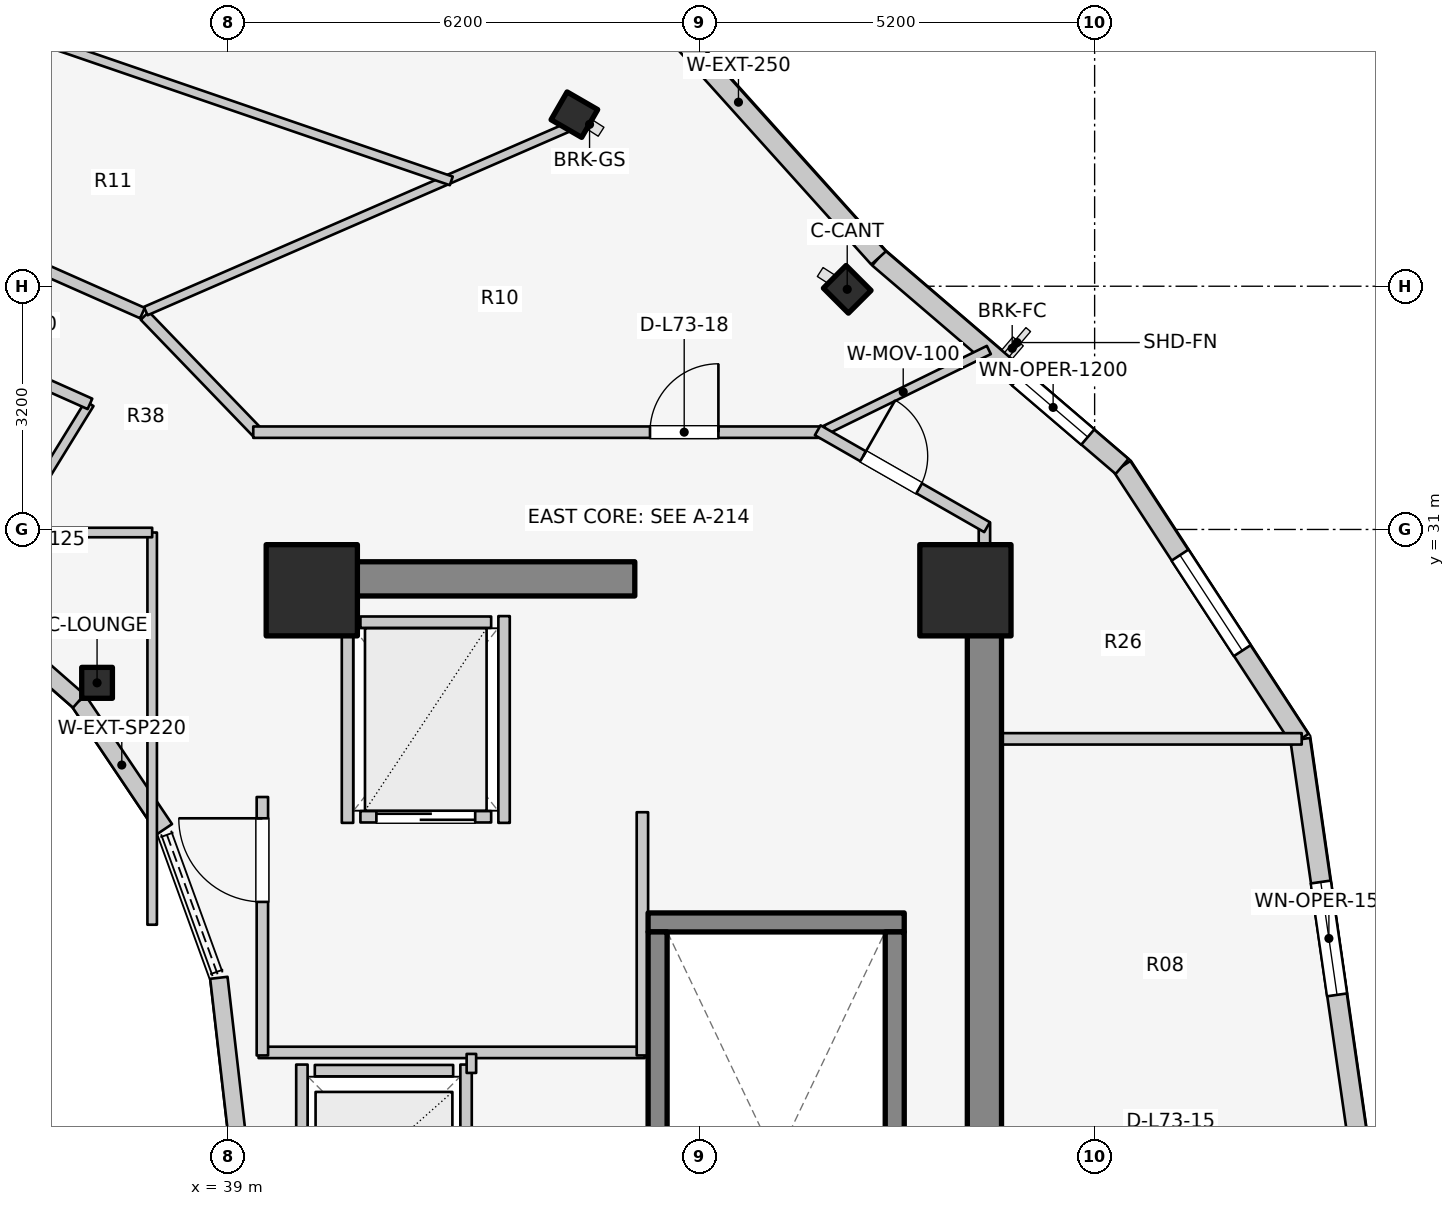
"""IFC4 building model, lengths in metres.
Left out: names, types, materials, properties, quantities, classifications, styles, units other than length and angle.
Written with IfcOpenShell. Run it as: python <this file> out.ifc"""

import sys

from ifc_helpers import new_model, si_unit, direction, frame, frame_2d, origin, origin_2d, place, context, subcontext, project, spatial, rectangle, i_section, extrude, element, fill, save


model = new_model("IFC4")
c1 = context("Model", 3, precision=1e-05, world=origin(), true_north=direction((0.0, 1.0)))
c2 = subcontext(c1, "Body", "Model", "MODEL_VIEW")
j1 = project(units=[si_unit("LENGTHUNIT", "METRE"), si_unit("PLANEANGLEUNIT", "RADIAN")], contexts=[c1])
p1 = place(None, origin())
s1 = spatial("IfcSite", under=j1, at=p1, CompositionType="ELEMENT")
p2 = place(p1, origin())
s2 = spatial("IfcBuilding", under=s1, at=p2, CompositionType="ELEMENT")
p3 = place(p2, frame((0.0, 0.0, 238.8)))
s3 = spatial("IfcBuildingStorey", under=s2, at=p3, CompositionType="ELEMENT", Elevation=238.8)
p4 = place(p3, frame((48.95, 17.05, 0.0), z_axis=(0.0, 0.0, 1.0), x_axis=(0.0, 1.0, 0.0)))
e1 = element("IfcWall", 1, at=p4, inside=s3, PredefinedType="SHEAR", context=c2, shape_type="SweptSolid", body=[
    extrude(rectangle(XDim=12.8, YDim=0.45, at=frame_2d((6.4, 0.0))), origin(), (0.0, 0.0, 1.0), 3.6),
])
p5 = place(p3, frame((39.85, 30.35, 0.0), z_axis=(0.0, 0.0, 1.0), x_axis=(1.0, 0.0, 0.0)))
e2 = element("IfcWall", 2, at=p5, inside=s3, PredefinedType="SHEAR", context=c2, shape_type="SweptSolid", body=[
    extrude(rectangle(XDim=4.5, YDim=0.45, at=frame_2d((2.25, 0.0))), origin(), (0.0, 0.0, 1.0), 3.6),
])
p6 = place(p3, frame((44.525, 25.83, 0.0), z_axis=(0.0, 0.0, 1.0), x_axis=(1.0, 0.0, 0.0)))
e3 = element("IfcWall", 3, at=p6, inside=s3, PredefinedType="SOLIDWALL", context=c2, shape_type="SweptSolid", body=[
    extrude(rectangle(XDim=3.37, YDim=0.25, at=frame_2d((1.685, 0.0))), origin(), (0.0, 0.0, 1.0), 3.6),
])
for number, where, z_axis, x_axis in (
    (4, (44.65, 17.895, 0.0), (0.0, 0.0, 1.0), (0.0, 1.0, 0.0)),
    (5, (47.77, 17.895, 0.0), (0.0, 0.0, 1.0), (0.0, 1.0, 0.0)),
):
    element("IfcWall", number, at=place(p3, frame(where, z_axis=z_axis, x_axis=x_axis)), inside=s3, PredefinedType="SOLIDWALL", context=c2, shape_type="SweptSolid", body=[
        extrude(rectangle(XDim=7.81, YDim=0.25, at=frame_2d((3.905, 0.0))), origin(), (0.0, 0.0, 1.0), 3.6),
    ])
for number, where, z_axis, x_axis in (
    (6, (48.7, 30.2, 0.0), (0.0, 0.0, 1.0), (1.0, 0.0, 0.0)),
    (7, (40.1, 30.2, 0.0), (0.0, 0.0, 1.0), (1.0, 0.0, 0.0)),
):
    element("IfcColumn", number, at=place(p3, frame(where, z_axis=z_axis, x_axis=x_axis)), inside=s3, PredefinedType="COLUMN", context=c2, shape_type="SweptSolid", body=[
        extrude(rectangle(XDim=1.2, YDim=1.2, at=origin_2d()), origin(), (0.0, 0.0, 1.0), 3.6),
    ])
p7 = place(p3, frame((37.275, 28.982, 0.0), z_axis=(0.0, 0.0, 1.0), x_axis=(1.0, 0.0, 0.0)))
e8 = element("IfcColumn", 8, at=p7, inside=s3, PredefinedType="COLUMN", context=c2, shape_type="SweptSolid", body=[
    extrude(i_section(OverallWidth=0.404, OverallDepth=0.407, WebThickness=0.027, FlangeThickness=0.044, FilletRadius=0.025, at=origin_2d()), origin(), (0.0, 0.0, 1.0), 3.6),
])
for number, where, z_axis, x_axis in (
    (9, (47.145, 34.159, 0.0), (0.0, 0.0, 1.0), (0.707, 0.707, 0.0)),
    (10, (43.555, 36.457, 0.0), (0.0, 0.0, 1.0), (0.5, 0.866, 0.0)),
):
    element("IfcColumn", number, at=place(p3, frame(where, z_axis=z_axis, x_axis=x_axis)), inside=s3, PredefinedType="COLUMN", context=c2, shape_type="SweptSolid", body=[
        extrude(i_section(OverallWidth=0.422, OverallDepth=0.465, WebThickness=0.045, FlangeThickness=0.073, FilletRadius=0.025, at=origin_2d()), origin(), (0.0, 0.0, 1.0), 3.6),
    ])
p8 = place(p3, frame((39.12, 23.0, 0.0), z_axis=(0.0, 0.0, 1.0), x_axis=(-0.114711713601, 0.993398823617, 0.0)))
e11 = element("IfcWall", 11, at=p8, inside=s3, PredefinedType="STANDARD", context=c2, shape_type="SweptSolid", body=[
    extrude(rectangle(XDim=2.115, YDim=0.23, at=frame_2d((1.058, 0.0))), origin(), (0.0, 0.0, 1.0), 3.28),
])
p9 = place(p3, frame((38.166, 27.06, 0.0), z_axis=(0.0, 0.0, 1.0), x_axis=(-0.558197800898, 0.829707909492, 0.0)))
e12 = element("IfcWall", 12, at=p9, inside=s3, PredefinedType="STANDARD", context=c2, shape_type="SweptSolid", body=[
    extrude(rectangle(XDim=2.027, YDim=0.23, at=frame_2d((1.013, 0.0))), origin(), (0.0, 0.0, 1.0), 2.6),
])
p10 = place(p3, frame((37.035, 28.742, 0.0), z_axis=(0.0, 0.0, 1.0), x_axis=(-0.752576694707, 0.658504607869, 0.0)))
e13 = element("IfcWall", 13, at=p10, inside=s3, PredefinedType="STANDARD", context=c2, shape_type="SweptSolid", body=[
    extrude(rectangle(XDim=1.959, YDim=0.23, at=frame_2d((0.98, 0.0))), origin(), (0.0, 0.0, 1.0), 2.6),
])
p11 = place(p3, frame((53.86, 23.0, 0.0), z_axis=(0.0, 0.0, 1.0), x_axis=(-0.142712754019, 0.989764148593, 0.0)))
e14 = element("IfcWall", 14, at=p11, inside=s3, PredefinedType="STANDARD", context=c2, shape_type="SweptSolid", body=[
    extrude(rectangle(XDim=5.293, YDim=0.26, at=frame_2d((2.646, 0.0))), origin(), (0.0, 0.0, 1.0), 3.29),
])
p12 = place(p11, frame((1.896, 0.0, 0.75)))
e15 = element("IfcOpeningElement", 15, at=p12, cuts=e14, PredefinedType="OPENING", context=c2, shape_type="SweptSolid", body=[
    extrude(rectangle(XDim=1.5, YDim=1.6, at=frame_2d((0.75, 0.8))), frame((0.0, 0.14, 0.0), z_axis=(0.0, -1.0, 0.0), x_axis=(1.0, 0.0, 0.0)), (0.0, 0.0, 1.0), 0.28),
])
p13 = place(p3, frame((53.105, 28.239, 0.0), z_axis=(0.0, 0.0, 1.0), x_axis=(-0.546606419826, 0.837389647539, 0.0)))
e16 = element("IfcWall", 16, at=p13, inside=s3, PredefinedType="STANDARD", context=c2, shape_type="SweptSolid", body=[
    extrude(rectangle(XDim=4.288, YDim=0.26, at=frame_2d((2.144, 0.0))), origin(), (0.0, 0.0, 1.0), 3.29),
])
p14 = place(p13, frame((1.394, 0.0, 0.75)))
e17 = element("IfcOpeningElement", 17, at=p14, cuts=e16, PredefinedType="OPENING", context=c2, shape_type="SweptSolid", body=[
    extrude(rectangle(XDim=1.5, YDim=1.6, at=frame_2d((0.75, 0.8))), frame((0.0, 0.14, 0.0), z_axis=(0.0, -1.0, 0.0), x_axis=(1.0, 0.0, 0.0)), (0.0, 0.0, 1.0), 0.28),
])
p15 = place(p3, frame((50.761, 31.829, 0.0), z_axis=(0.0, 0.0, 1.0), x_axis=(-0.759587504333, 0.650405122413, 0.0)))
e18 = element("IfcWall", 18, at=p15, inside=s3, PredefinedType="STANDARD", context=c2, shape_type="SweptSolid", body=[
    extrude(rectangle(XDim=4.217, YDim=0.26, at=frame_2d((2.109, 0.0))), origin(), (0.0, 0.0, 1.0), 3.29),
])
p16 = place(p15, frame((0.594, 0.0, 0.75)))
e19 = element("IfcOpeningElement", 19, at=p16, cuts=e18, PredefinedType="OPENING", context=c2, shape_type="SweptSolid", body=[
    extrude(rectangle(XDim=1.2, YDim=1.5, at=frame_2d((0.6, 0.75))), frame((0.0, 0.14, 0.0), z_axis=(0.0, -1.0, 0.0), x_axis=(1.0, 0.0, 0.0)), (0.0, 0.0, 1.0), 0.28),
])
p17 = place(p3, frame((47.558, 34.572, 0.0), z_axis=(0.0, 0.0, 1.0), x_axis=(-0.668903560134, 0.743349196031, 0.0)))
e20 = element("IfcWall", 20, at=p17, inside=s3, PredefinedType="STANDARD", context=c2, shape_type="SweptSolid", body=[
    extrude(rectangle(XDim=5.513, YDim=0.26, at=frame_2d((2.756, 0.0))), origin(), (0.0, 0.0, 1.0), 3.29),
])
p18 = place(p3, frame((40.14, 23.88, 0.0), z_axis=(0.0, 0.0, 1.0), x_axis=(1.0, 0.0, 0.0)))
e21 = element("IfcWall", 21, at=p18, inside=s3, PredefinedType="SOLIDWALL", context=c2, shape_type="SweptSolid", body=[
    extrude(rectangle(XDim=1.82, YDim=0.15, at=frame_2d((0.91, 0.0))), origin(), (0.0, 0.0, 1.0), 2.62),
])
p19 = place(p3, frame((39.97, 21.64, 0.0), z_axis=(0.0, 0.0, 1.0), x_axis=(0.0, 1.0, 0.0)))
e22 = element("IfcWall", 22, at=p19, inside=s3, PredefinedType="SOLIDWALL", context=c2, shape_type="SweptSolid", body=[
    extrude(rectangle(XDim=2.32, YDim=0.15, at=frame_2d((1.16, 0.0))), origin(), (0.0, 0.0, 1.0), 2.62),
])
p20 = place(p3, frame((42.13, 21.64, 0.0), z_axis=(0.0, 0.0, 1.0), x_axis=(0.0, 1.0, 0.0)))
e23 = element("IfcWall", 23, at=p20, inside=s3, PredefinedType="SOLIDWALL", context=c2, shape_type="SweptSolid", body=[
    extrude(rectangle(XDim=2.32, YDim=0.15, at=frame_2d((1.16, 0.0))), origin(), (0.0, 0.0, 1.0), 3.295),
])
p21 = place(p3, frame((40.74, 27.22, 0.0), z_axis=(0.0, 0.0, 1.0), x_axis=(1.0, 0.0, 0.0)))
e24 = element("IfcWall", 24, at=p21, inside=s3, PredefinedType="SOLIDWALL", context=c2, shape_type="SweptSolid", body=[
    extrude(rectangle(XDim=1.72, YDim=0.15, at=frame_2d((0.86, 0.0))), origin(), (0.0, 0.0, 1.0), 3.295),
])
p22 = place(p21, frame((0.21, 0.0, 0.0)))
e25 = element("IfcOpeningElement", 25, at=p22, cuts=e24, PredefinedType="OPENING", context=c2, shape_type="SweptSolid", body=[
    extrude(rectangle(XDim=1.3, YDim=2.1, at=frame_2d((0.65, 1.05))), frame((0.0, 0.085, 0.0), z_axis=(0.0, -1.0, 0.0), x_axis=(1.0, 0.0, 0.0)), (0.0, 0.0, 1.0), 0.17),
])
p23 = place(p3, frame((40.74, 29.78, 0.0), z_axis=(0.0, 0.0, 1.0), x_axis=(1.0, 0.0, 0.0)))
e26 = element("IfcWall", 26, at=p23, inside=s3, PredefinedType="SOLIDWALL", context=c2, shape_type="SweptSolid", body=[
    extrude(rectangle(XDim=1.72, YDim=0.15, at=frame_2d((0.86, 0.0))), origin(), (0.0, 0.0, 1.0), 3.295),
])
for number, where, z_axis, x_axis in (
    (27, (40.57, 27.14, 0.0), (0.0, 0.0, 1.0), (0.0, 1.0, 0.0)),
    (28, (42.63, 27.14, 0.0), (0.0, 0.0, 1.0), (0.0, 1.0, 0.0)),
):
    element("IfcWall", number, at=place(p3, frame(where, z_axis=z_axis, x_axis=x_axis)), inside=s3, PredefinedType="SOLIDWALL", context=c2, shape_type="SweptSolid", body=[
        extrude(rectangle(XDim=2.72, YDim=0.15, at=frame_2d((1.36, 0.0))), origin(), (0.0, 0.0, 1.0), 3.295),
    ])
p24 = place(p3, frame((39.4, 24.12, 0.0), z_axis=(0.0, 0.0, 1.0), x_axis=(1.0, 0.0, 0.0)))
e29 = element("IfcWall", 29, at=p24, inside=s3, PredefinedType="PARTITIONING", context=c2, shape_type="SweptSolid", body=[
    extrude(rectangle(XDim=5.08, YDim=0.15, at=frame_2d((2.54, 0.0))), origin(), (0.0, 0.0, 1.0), 2.62),
])
p25 = place(p3, frame((44.45, 24.08, 0.0), z_axis=(0.0, 0.0, 1.0), x_axis=(0.0, 1.0, 0.0)))
e30 = element("IfcWall", 30, at=p25, inside=s3, PredefinedType="PARTITIONING", context=c2, shape_type="SweptSolid", body=[
    extrude(rectangle(XDim=3.2, YDim=0.15, at=frame_2d((1.6, 0.0))), origin(), (0.0, 0.0, 1.0), 3.295),
])
p26 = place(p3, frame((39.45, 24.08, 0.0), z_axis=(0.0, 0.0, 1.0), x_axis=(0.0, 1.0, 0.0)))
e31 = element("IfcWall", 31, at=p26, inside=s3, PredefinedType="PARTITIONING", context=c2, shape_type="SweptSolid", body=[
    extrude(rectangle(XDim=3.4, YDim=0.15, at=frame_2d((1.7, 0.0))), origin(), (0.0, 0.0, 1.0), 3.295),
])
p27 = place(p26, frame((2.02, 0.0, 0.0)))
e32 = element("IfcOpeningElement", 32, at=p27, cuts=e31, PredefinedType="OPENING", context=c2, shape_type="SweptSolid", body=[
    extrude(rectangle(XDim=1.1, YDim=2.1, at=frame_2d((0.55, 1.05))), frame((0.0, 0.085, 0.0), z_axis=(0.0, -1.0, 0.0), x_axis=(1.0, 0.0, 0.0)), (0.0, 0.0, 1.0), 0.17),
])
p28 = place(p3, frame((42.2, 23.85, 0.0), z_axis=(0.0, 0.0, 1.0), x_axis=(0.0, 1.0, 0.0)))
e33 = element("IfcWall", 33, at=p28, inside=s3, PredefinedType="PARTITIONING", context=c2, shape_type="SweptSolid", body=[
    extrude(rectangle(XDim=0.25, YDim=0.125, at=frame_2d((0.125, 0.0))), origin(), (0.0, 0.0, 1.0), 3.295),
])
p29 = place(p3, frame((35.55, 30.015, 0.0), z_axis=(0.0, 0.0, 1.0), x_axis=(0.523992004803, 0.851723182086, 0.0)))
e34 = element("IfcWall", 34, at=p29, inside=s3, PredefinedType="PARTITIONING", context=c2, shape_type="SweptSolid", body=[
    extrude(rectangle(XDim=3.101, YDim=0.125, at=frame_2d((1.551, 0.0))), origin(), (0.0, 0.0, 1.0), 2.672),
])
p30 = place(p3, frame((37.181, 32.652, 0.0), z_axis=(0.0, 0.0, 1.0), x_axis=(-0.913120130558, 0.407690602257, 0.0)))
e35 = element("IfcWall", 35, at=p30, inside=s3, PredefinedType="PARTITIONING", context=c2, shape_type="SweptSolid", body=[
    extrude(rectangle(XDim=2.743, YDim=0.15, at=frame_2d((1.371, 0.0))), origin(), (0.0, 0.0, 1.0), 2.823),
])
p31 = place(p3, frame((38.0, 25.8, 0.0), z_axis=(0.0, 0.0, 1.0), x_axis=(0.0, 1.0, 0.0)))
e36 = element("IfcWall", 36, at=p31, inside=s3, PredefinedType="PARTITIONING", context=c2, shape_type="SweptSolid", body=[
    extrude(rectangle(XDim=5.16, YDim=0.125, at=frame_2d((2.58, 0.0))), origin(), (0.0, 0.0, 1.0), 2.672),
])
p32 = place(p3, frame((35.4, 30.96, 0.0), z_axis=(0.0, 0.0, 1.0), x_axis=(1.0, 0.0, 0.0)))
e37 = element("IfcWall", 37, at=p32, inside=s3, PredefinedType="PARTITIONING", context=c2, shape_type="SweptSolid", body=[
    extrude(rectangle(XDim=2.6, YDim=0.125, at=frame_2d((1.3, 0.0))), origin(), (0.0, 0.0, 1.0), 2.816),
])
p33 = place(p3, frame((48.95, 28.245, 0.0), z_axis=(0.0, 0.0, 1.0), x_axis=(1.0, 0.0, 0.0)))
e38 = element("IfcWall", 38, at=p33, inside=s3, PredefinedType="PARTITIONING", context=c2, shape_type="SweptSolid", body=[
    extrude(rectangle(XDim=4.175, YDim=0.15, at=frame_2d((2.087, 0.0))), origin(), (0.0, 0.0, 1.0), 3.295),
])
p34 = place(p3, frame((48.95, 29.8, 0.0), z_axis=(0.0, 0.0, 1.0), x_axis=(0.0, 1.0, 0.0)))
e39 = element("IfcWall", 39, at=p34, inside=s3, PredefinedType="PARTITIONING", context=c2, shape_type="SweptSolid", body=[
    extrude(rectangle(XDim=1.29, YDim=0.15, at=frame_2d((0.645, 0.0))), origin(), (0.0, 0.0, 1.0), 3.295),
])
p35 = place(p3, frame((46.755, 32.258, 0.0), z_axis=(0.0, 0.0, 1.0), x_axis=(0.898152129572, 0.439684832745, 0.0)))
e40 = element("IfcWall", 40, at=p35, inside=s3, PredefinedType="MOVABLE", context=c2, shape_type="SweptSolid", body=[
    extrude(rectangle(XDim=2.509, YDim=0.12, at=frame_2d((1.254, 0.0))), origin(), (0.0, 0.0, 1.0), 2.66),
])
p36 = place(p3, frame((37.903, 33.812, 0.0), z_axis=(0.0, 0.0, 1.0), x_axis=(0.694032962553, -0.719943224768, 0.0)))
e41 = element("IfcWall", 41, at=p36, inside=s3, PredefinedType="PARTITIONING", context=c2, shape_type="SweptSolid", body=[
    extrude(rectangle(XDim=2.158, YDim=0.15, at=frame_2d((1.079, 0.0))), origin(), (0.0, 0.0, 1.0), 2.816),
])
p37 = place(p3, frame((39.33, 32.28, 0.0), z_axis=(0.0, 0.0, 1.0), x_axis=(1.0, 0.0, 0.0)))
e42 = element("IfcWall", 42, at=p37, inside=s3, PredefinedType="PARTITIONING", context=c2, shape_type="SweptSolid", body=[
    extrude(rectangle(XDim=7.52, YDim=0.15, at=frame_2d((3.76, 0.0))), origin(), (0.0, 0.0, 1.0), 2.816),
])
p38 = place(p37, frame((5.22, 0.0, 0.0)))
e43 = element("IfcOpeningElement", 43, at=p38, cuts=e42, PredefinedType="OPENING", context=c2, shape_type="SweptSolid", body=[
    extrude(rectangle(XDim=0.9, YDim=2.1, at=frame_2d((0.45, 1.05))), frame((0.0, 0.085, 0.0), z_axis=(0.0, -1.0, 0.0), x_axis=(1.0, 0.0, 0.0)), (0.0, 0.0, 1.0), 0.17),
])
p39 = place(p3, frame((46.757, 32.305, 0.0), z_axis=(0.0, 0.0, 1.0), x_axis=(0.867991349648, -0.496579315857, 0.0)))
e44 = element("IfcWall", 44, at=p39, inside=s3, PredefinedType="PARTITIONING", context=c2, shape_type="SweptSolid", body=[
    extrude(rectangle(XDim=2.567, YDim=0.15, at=frame_2d((1.283, 0.0))), origin(), (0.0, 0.0, 1.0), 2.66),
])
p40 = place(p39, frame((0.688, 0.0, 0.0)))
e45 = element("IfcOpeningElement", 45, at=p40, cuts=e44, PredefinedType="OPENING", context=c2, shape_type="SweptSolid", body=[
    extrude(rectangle(XDim=0.85, YDim=2.05, at=frame_2d((0.425, 1.025))), frame((0.0, 0.085, 0.0), z_axis=(0.0, -1.0, 0.0), x_axis=(1.0, 0.0, 0.0)), (0.0, 0.0, 1.0), 0.17),
])
p41 = place(p3, frame((37.915, 33.873, 0.0), z_axis=(0.0, 0.0, 1.0), x_axis=(0.916946661839, 0.399009798554, 0.0)))
e46 = element("IfcWall", 46, at=p41, inside=s3, PredefinedType="MOVABLE", context=c2, shape_type="SweptSolid", body=[
    extrude(rectangle(XDim=6.042, YDim=0.12, at=frame_2d((3.021, 0.0))), origin(), (0.0, 0.0, 1.0), 2.66),
])
p42 = place(p3, frame((37.872, 33.847, 0.0), z_axis=(0.0, 0.0, 1.0), x_axis=(-0.914384748819, 0.404846305563, 0.0)))
e47 = element("IfcWall", 47, at=p42, inside=s3, PredefinedType="PARTITIONING", context=c2, shape_type="SweptSolid", body=[
    extrude(rectangle(XDim=3.104, YDim=0.15, at=frame_2d((1.552, 0.0))), origin(), (0.0, 0.0, 1.0), 2.823),
])
p43 = place(p3, frame((41.935, 35.586, 0.0), z_axis=(0.0, 0.0, 1.0), x_axis=(-0.945789589552, 0.324780005995, 0.0)))
e48 = element("IfcWall", 48, at=p43, inside=s3, PredefinedType="MOVABLE", context=c2, shape_type="SweptSolid", body=[
    extrude(rectangle(XDim=6.465, YDim=0.12, at=frame_2d((3.232, 0.0))), origin(), (0.0, 0.0, 1.0), 2.823),
])
p44 = place(p12, origin())
e49 = element("IfcWindow", 49, at=p44, inside=s3, PartitioningType="SINGLE_PANEL", PredefinedType="WINDOW", context=c2, shape_type="SweptSolid", body=[
    extrude(rectangle(XDim=1.5, YDim=1.6, at=frame_2d((0.75, 0.8))), frame((0.0, 0.03, 0.0), z_axis=(0.0, -1.0, 0.0), x_axis=(1.0, 0.0, 0.0)), (0.0, 0.0, 1.0), 0.06),
])
fill(e15, e49)
p45 = place(p14, origin())
e50 = element("IfcWindow", 50, at=p45, inside=s3, PartitioningType="SINGLE_PANEL", PredefinedType="WINDOW", context=c2, shape_type="SweptSolid", body=[
    extrude(rectangle(XDim=1.5, YDim=1.6, at=frame_2d((0.75, 0.8))), frame((0.0, 0.03, 0.0), z_axis=(0.0, -1.0, 0.0), x_axis=(1.0, 0.0, 0.0)), (0.0, 0.0, 1.0), 0.06),
])
fill(e17, e50)
p46 = place(p16, origin())
e51 = element("IfcWindow", 51, at=p46, inside=s3, PartitioningType="SINGLE_PANEL", PredefinedType="WINDOW", context=c2, shape_type="SweptSolid", body=[
    extrude(rectangle(XDim=1.2, YDim=1.5, at=frame_2d((0.6, 0.75))), frame((0.0, 0.03, 0.0), z_axis=(0.0, -1.0, 0.0), x_axis=(1.0, 0.0, 0.0)), (0.0, 0.0, 1.0), 0.06),
])
fill(e19, e51)
p47 = place(p22, origin())
e52 = element("IfcDoor", 52, at=p47, inside=s3, OperationType="DOUBLE_DOOR_SLIDING", PredefinedType="DOOR", context=c2, shape_type="SweptSolid", body=[
    extrude(rectangle(XDim=1.3, YDim=2.1, at=frame_2d((0.65, 1.05))), frame((0.0, 0.025, 0.0), z_axis=(0.0, -1.0, 0.0), x_axis=(1.0, 0.0, 0.0)), (0.0, 0.0, 1.0), 0.05),
])
fill(e25, e52)
p48 = place(p27, origin())
e53 = element("IfcDoor", 53, at=p48, inside=s3, OperationType="SINGLE_SWING_RIGHT", PredefinedType="DOOR", context=c2, shape_type="SweptSolid", body=[
    extrude(rectangle(XDim=1.1, YDim=2.1, at=frame_2d((0.55, 1.05))), frame((0.0, 0.025, 0.0), z_axis=(0.0, -1.0, 0.0), x_axis=(1.0, 0.0, 0.0)), (0.0, 0.0, 1.0), 0.05),
])
fill(e32, e53)
p49 = place(p38, origin())
e54 = element("IfcDoor", 54, at=p49, inside=s3, OperationType="SINGLE_SWING_RIGHT", PredefinedType="DOOR", context=c2, shape_type="SweptSolid", body=[
    extrude(rectangle(XDim=0.9, YDim=2.1, at=frame_2d((0.45, 1.05))), frame((0.0, 0.025, 0.0), z_axis=(0.0, -1.0, 0.0), x_axis=(1.0, 0.0, 0.0)), (0.0, 0.0, 1.0), 0.05),
])
fill(e43, e54)
p50 = place(p40, origin())
e55 = element("IfcDoor", 55, at=p50, inside=s3, OperationType="SINGLE_SWING_LEFT", PredefinedType="DOOR", context=c2, shape_type="SweptSolid", body=[
    extrude(rectangle(XDim=0.85, YDim=2.05, at=frame_2d((0.425, 1.025))), frame((0.0, 0.025, 0.0), z_axis=(0.0, -1.0, 0.0), x_axis=(1.0, 0.0, 0.0)), (0.0, 0.0, 1.0), 0.05),
])
fill(e45, e55)
save(model, sys.argv[1])
